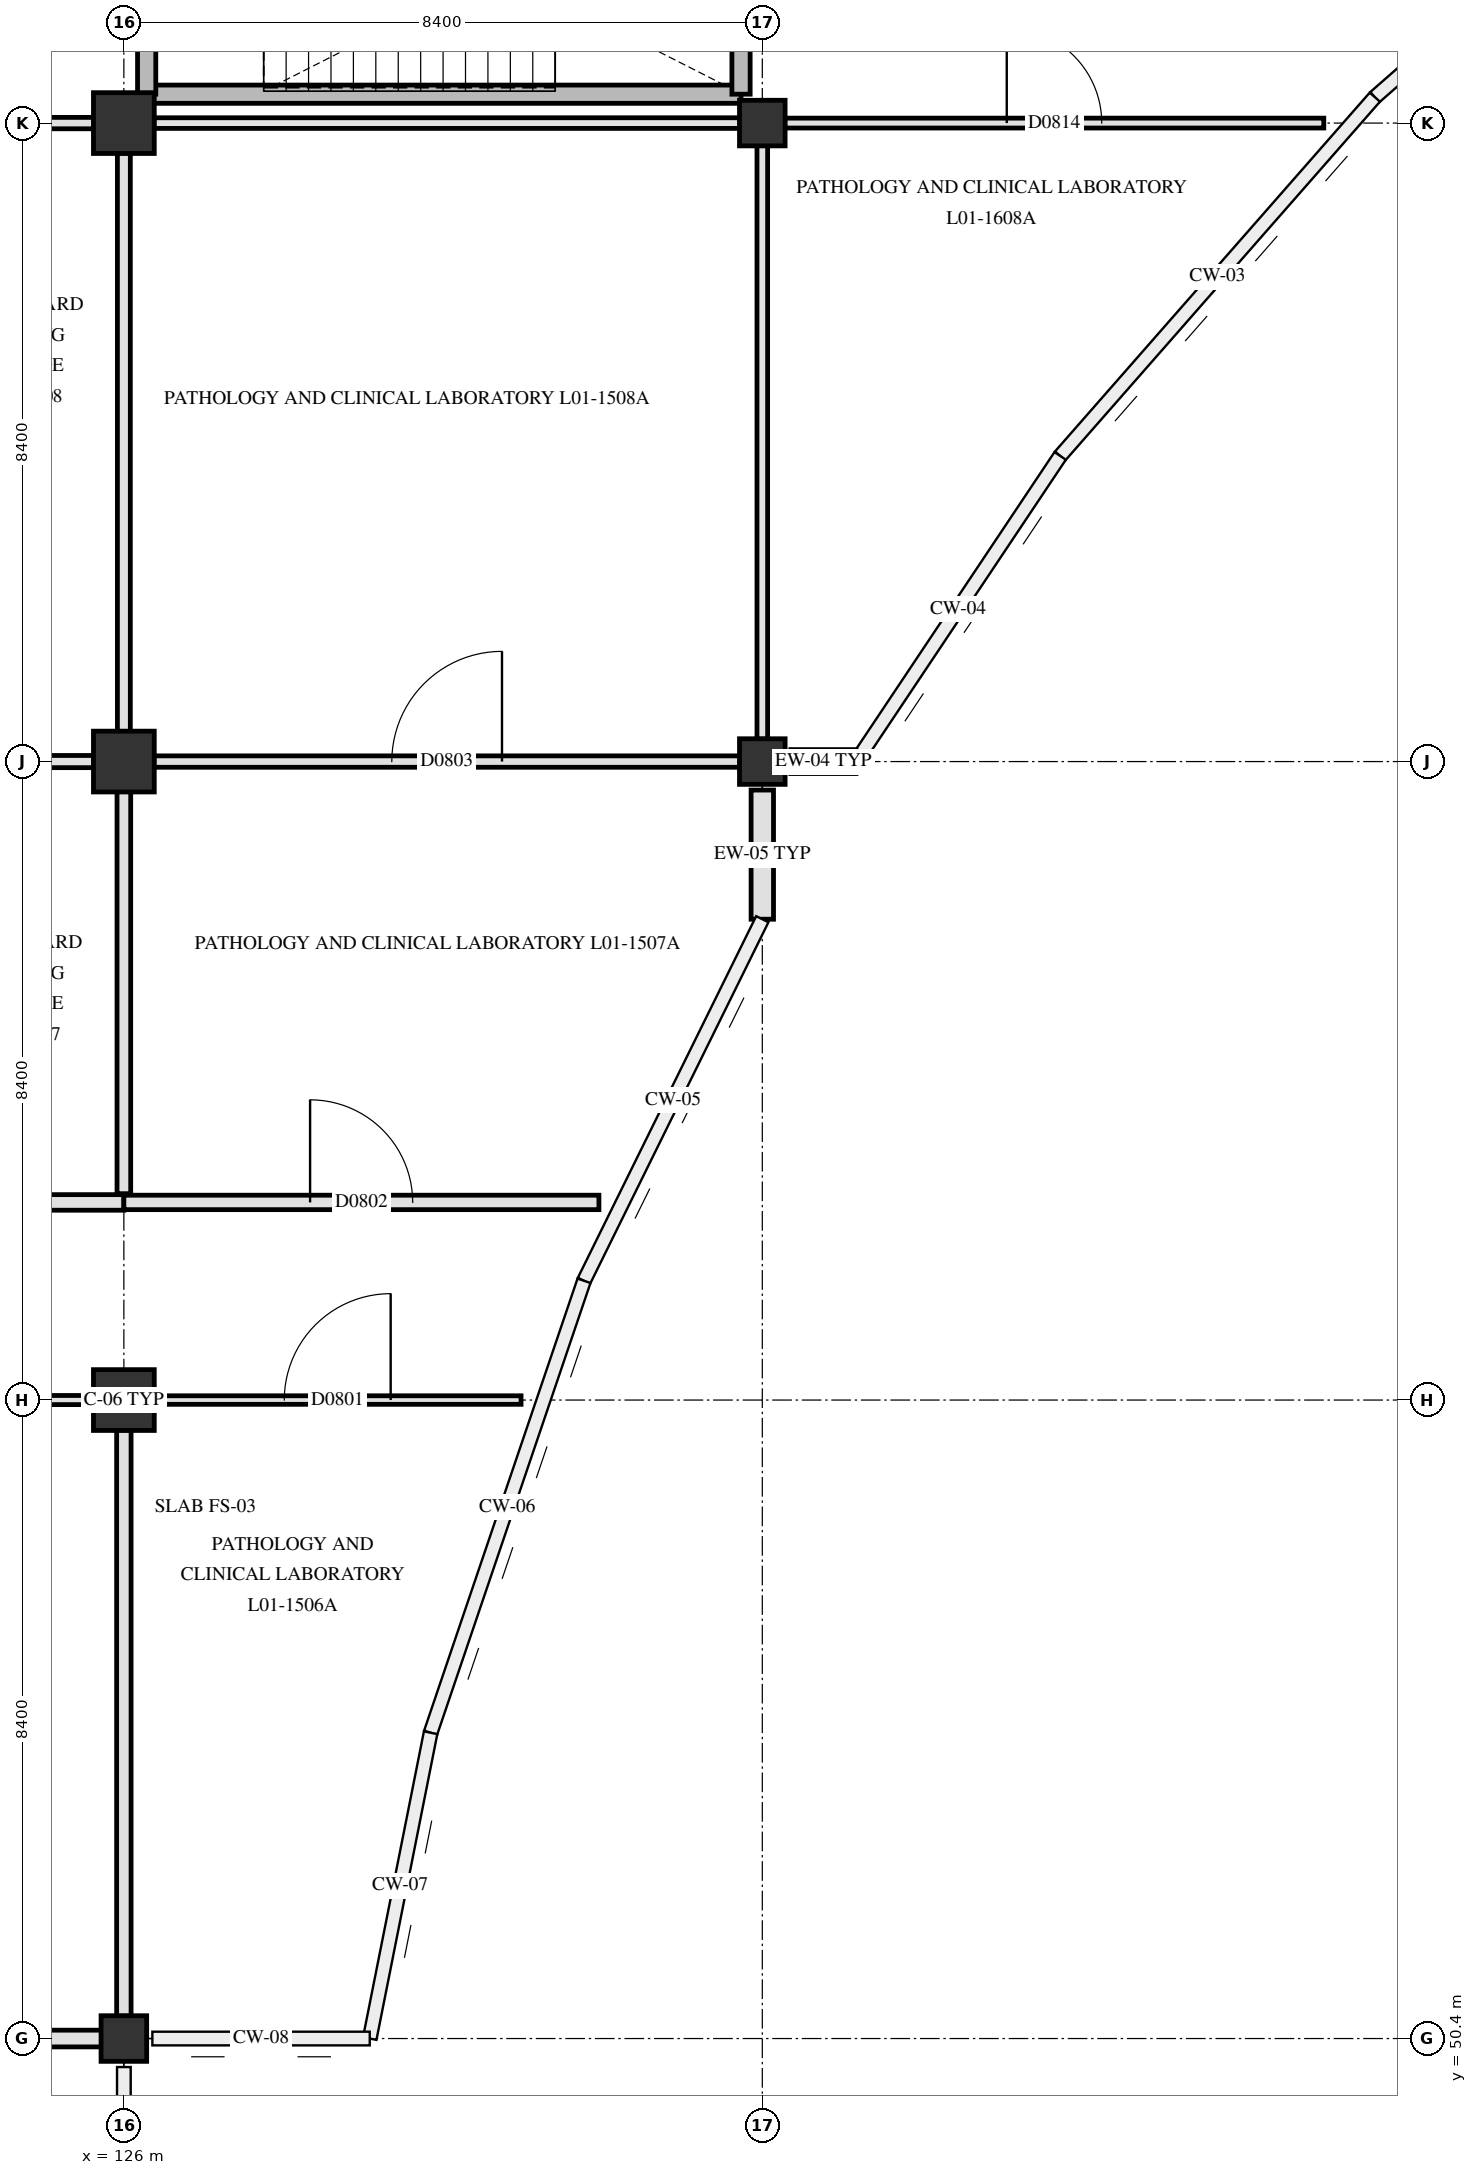
"""IFC4 building model, lengths in metres.
Left out: names, types, materials, properties, quantities, classifications, styles, units other than length and angle.
Written with IfcOpenShell. Run it as: python <this file> out.ifc"""

import sys

from ifc_helpers import new_model, si_unit, direction, frame, frame_2d, origin, origin_2d, place, context, subcontext, project, spatial, rectangle, circle, extrude, element, fill, save


model = new_model("IFC4")
c1 = context("Model", 3, precision=1e-05, world=origin(), true_north=direction((0.0, 1.0)))
c2 = subcontext(c1, "Body", "Model", "MODEL_VIEW")
j1 = project(units=[si_unit("LENGTHUNIT", "METRE"), si_unit("PLANEANGLEUNIT", "RADIAN")], contexts=[c1])
p1 = place(None, origin())
s1 = spatial("IfcSite", under=j1, at=p1, CompositionType="ELEMENT")
p2 = place(p1, origin())
s2 = spatial("IfcBuilding", under=s1, at=p2, CompositionType="ELEMENT")
p3 = place(p2, frame((0.0, 0.0, 4.8)))
s3 = spatial("IfcBuildingStorey", under=s2, at=p3, CompositionType="ELEMENT", Elevation=4.8)
p4 = place(p3, frame((126.0, 50.4, 0.0), z_axis=(0.0, 0.0, 1.0), x_axis=(1.0, 0.0, 0.0)))
e1 = element("IfcColumn", 1, at=p4, inside=s3, PredefinedType="COLUMN", context=c2, shape_type="SweptSolid", body=[
    extrude(rectangle(XDim=0.6, YDim=0.6, at=origin_2d()), origin(), (0.0, 0.0, 1.0), 4.5),
])
for number, where, z_axis, x_axis in (
    (2, (126.0, 58.8, 0.0), (0.0, 0.0, 1.0), (1.0, 0.0, 0.0)),
    (3, (126.0, 67.2, 0.0), (0.0, 0.0, 1.0), (1.0, 0.0, 0.0)),
    (4, (126.0, 75.6, 0.0), (0.0, 0.0, 1.0), (1.0, 0.0, 0.0)),
):
    element("IfcColumn", number, at=place(p3, frame(where, z_axis=z_axis, x_axis=x_axis)), inside=s3, PredefinedType="COLUMN", context=c2, shape_type="SweptSolid", body=[
        extrude(circle(Radius=0.4, at=origin_2d()), origin(), (0.0, 0.0, 1.0), 4.5),
    ])
for number, where, z_axis, x_axis in (
    (5, (134.4, 67.2, 0.0), (0.0, 0.0, 1.0), (1.0, 0.0, 0.0)),
    (6, (134.4, 75.6, 0.0), (0.0, 0.0, 1.0), (1.0, 0.0, 0.0)),
):
    element("IfcColumn", number, at=place(p3, frame(where, z_axis=z_axis, x_axis=x_axis)), inside=s3, PredefinedType="COLUMN", context=c2, shape_type="SweptSolid", body=[
        extrude(rectangle(XDim=0.6, YDim=0.6, at=origin_2d()), origin(), (0.0, 0.0, 1.0), 4.5),
    ])
p5 = place(p3, frame((135.633, 67.2, 0.0), z_axis=(0.0, 0.0, 1.0), x_axis=(-1.0, 0.0, 0.0)))
e7 = element("IfcWall", 7, at=p5, inside=s3, PredefinedType="SOLIDWALL", context=c2, shape_type="SweptSolid", body=[
    extrude(rectangle(XDim=0.858, YDim=0.315, at=frame_2d((0.429, 0.0))), origin(), (0.0, 0.0, 1.0), 4.14),
])
p6 = place(p3, frame((134.4, 66.825, 0.0), z_axis=(0.0, 0.0, 1.0), x_axis=(0.0, -1.0, 0.0)))
e8 = element("IfcWall", 8, at=p6, inside=s3, PredefinedType="SOLIDWALL", context=c2, shape_type="SweptSolid", body=[
    extrude(rectangle(XDim=1.699, YDim=0.295, at=frame_2d((0.85, 0.0))), origin(), (0.0, 0.0, 1.0), 4.14),
])
p7 = place(p3, frame((126.3, 75.98, 0.0), z_axis=(0.0, 0.0, 1.0), x_axis=(1.0, 0.0, 0.0)))
e9 = element("IfcWall", 9, at=p7, inside=s3, PredefinedType="SHEAR", context=c2, shape_type="SweptSolid", body=[
    extrude(rectangle(XDim=7.82, YDim=0.24, at=frame_2d((3.91, 0.0))), origin(), (0.0, 0.0, 1.0), 4.15),
])
for number, where, z_axis, x_axis in (
    (10, (126.3, 75.98, 0.0), (0.0, 0.0, 1.0), (0.0, 1.0, 0.0)),
    (11, (134.12, 75.98, 0.0), (0.0, 0.0, 1.0), (0.0, 1.0, 0.0)),
):
    element("IfcWall", number, at=place(p3, frame(where, z_axis=z_axis, x_axis=x_axis)), inside=s3, PredefinedType="SHEAR", context=c2, shape_type="SweptSolid", body=[
        extrude(rectangle(XDim=3.32, YDim=0.24, at=frame_2d((1.66, 0.0))), origin(), (0.0, 0.0, 1.0), 4.15),
    ])
p8 = place(p3, frame((117.995, 50.4, 0.0), z_axis=(0.0, 0.0, 1.0), x_axis=(1.0, 0.0, 0.0)))
e12 = element("IfcWall", 12, at=p8, inside=s3, PredefinedType="PARTITIONING", context=c2, shape_type="SweptSolid", body=[
    extrude(rectangle(XDim=7.71, YDim=0.22, at=frame_2d((3.855, 0.0))), origin(), (0.0, 0.0, 1.0), 3.54),
])
p9 = place(p3, frame((117.995, 58.8, 0.0), z_axis=(0.0, 0.0, 1.0), x_axis=(1.0, 0.0, 0.0)))
e13 = element("IfcWall", 13, at=p9, inside=s3, PredefinedType="PARTITIONING", context=c2, shape_type="SweptSolid", body=[
    extrude(rectangle(XDim=7.61, YDim=0.12, at=frame_2d((3.805, 0.0))), origin(), (0.0, 0.0, 1.0), 3.54),
])
p10 = place(p9, frame((2.935, 0.0, 0.0)))
e14 = element("IfcOpeningElement", 14, at=p10, cuts=e13, PredefinedType="OPENING", context=c2, shape_type="SweptSolid", body=[
    extrude(rectangle(XDim=1.74, YDim=2.24, at=frame_2d((0.87, 1.12))), frame((0.0, 0.07, 0.0), z_axis=(0.0, -1.0, 0.0), x_axis=(1.0, 0.0, 0.0)), (0.0, 0.0, 1.0), 0.14),
])
p11 = place(p3, frame((126.395, 58.8, 0.0), z_axis=(0.0, 0.0, 1.0), x_axis=(1.0, 0.0, 0.0)))
e15 = element("IfcWall", 15, at=p11, inside=s3, PredefinedType="PARTITIONING", context=c2, shape_type="SweptSolid", body=[
    extrude(rectangle(XDim=4.831, YDim=0.112, at=frame_2d((2.416, 0.0))), origin(), (0.0, 0.0, 1.0), 4.14),
])
p12 = place(p11, frame((1.715, 0.0, 0.0)))
e16 = element("IfcOpeningElement", 16, at=p12, cuts=e15, PredefinedType="OPENING", context=c2, shape_type="SweptSolid", body=[
    extrude(rectangle(XDim=1.4, YDim=2.2, at=frame_2d((0.7, 1.1))), frame((0.0, 0.066, 0.0), z_axis=(0.0, -1.0, 0.0), x_axis=(1.0, 0.0, 0.0)), (0.0, 0.0, 1.0), 0.132),
])
p13 = place(p3, frame((121.075, 61.4, 0.0), z_axis=(0.0, 0.0, 1.0), x_axis=(1.0, 0.0, 0.0)))
e17 = element("IfcWall", 17, at=p13, inside=s3, PredefinedType="PARTITIONING", context=c2, shape_type="SweptSolid", body=[
    extrude(rectangle(XDim=4.925, YDim=0.205, at=frame_2d((2.462, 0.0))), origin(), (0.0, 0.0, 1.0), 3.59),
])
p14 = place(p13, frame((1.542, 0.0, 0.0)))
e18 = element("IfcOpeningElement", 18, at=p14, cuts=e17, PredefinedType="OPENING", context=c2, shape_type="SweptSolid", body=[
    extrude(rectangle(XDim=1.84, YDim=2.28, at=frame_2d((0.92, 1.14))), frame((0.0, 0.113, 0.0), z_axis=(0.0, -1.0, 0.0), x_axis=(1.0, 0.0, 0.0)), (0.0, 0.0, 1.0), 0.225),
])
p15 = place(p3, frame((126.0, 61.4, 0.0), z_axis=(0.0, 0.0, 1.0), x_axis=(1.0, 0.0, 0.0)))
e19 = element("IfcWall", 19, at=p15, inside=s3, PredefinedType="PARTITIONING", context=c2, shape_type="SweptSolid", body=[
    extrude(rectangle(XDim=6.25, YDim=0.19, at=frame_2d((3.125, 0.0))), origin(), (0.0, 0.0, 1.0), 3.59),
])
p16 = place(p15, frame((2.45, 0.0, 0.0)))
e20 = element("IfcOpeningElement", 20, at=p16, cuts=e19, PredefinedType="OPENING", context=c2, shape_type="SweptSolid", body=[
    extrude(rectangle(XDim=1.35, YDim=2.2, at=frame_2d((0.675, 1.1))), frame((0.0, 0.105, 0.0), z_axis=(0.0, -1.0, 0.0), x_axis=(1.0, 0.0, 0.0)), (0.0, 0.0, 1.0), 0.21),
])
p17 = place(p3, frame((124.1, 67.2, 0.0), z_axis=(0.0, 0.0, 1.0), x_axis=(1.0, 0.0, 0.0)))
e21 = element("IfcWall", 21, at=p17, inside=s3, PredefinedType="PARTITIONING", context=c2, shape_type="SweptSolid", body=[
    extrude(rectangle(XDim=1.505, YDim=0.16, at=frame_2d((0.752, 0.0))), origin(), (0.0, 0.0, 1.0), 4.14),
])
p18 = place(p3, frame((126.395, 67.2, 0.0), z_axis=(0.0, 0.0, 1.0), x_axis=(1.0, 0.0, 0.0)))
e22 = element("IfcWall", 22, at=p18, inside=s3, PredefinedType="PARTITIONING", context=c2, shape_type="SweptSolid", body=[
    extrude(rectangle(XDim=7.71, YDim=0.15, at=frame_2d((3.855, 0.0))), origin(), (0.0, 0.0, 1.0), 3.54),
])
p19 = place(p18, frame((3.13, 0.0, 0.0)))
e23 = element("IfcOpeningElement", 23, at=p19, cuts=e22, PredefinedType="OPENING", context=c2, shape_type="SweptSolid", body=[
    extrude(rectangle(XDim=1.45, YDim=2.2, at=frame_2d((0.725, 1.1))), frame((0.0, 0.085, 0.0), z_axis=(0.0, -1.0, 0.0), x_axis=(1.0, 0.0, 0.0)), (0.0, 0.0, 1.0), 0.17),
])
p20 = place(p3, frame((117.995, 75.6, 0.0), z_axis=(0.0, 0.0, 1.0), x_axis=(1.0, 0.0, 0.0)))
e24 = element("IfcWall", 24, at=p20, inside=s3, PredefinedType="PARTITIONING", context=c2, shape_type="SweptSolid", body=[
    extrude(rectangle(XDim=7.61, YDim=0.15, at=frame_2d((3.805, 0.0))), origin(), (0.0, 0.0, 1.0), 3.54),
])
p21 = place(p20, frame((3.295, 0.0, 0.0)))
e25 = element("IfcOpeningElement", 25, at=p21, cuts=e24, PredefinedType="OPENING", context=c2, shape_type="SweptSolid", body=[
    extrude(rectangle(XDim=1.02, YDim=2.12, at=frame_2d((0.51, 1.06))), frame((0.0, 0.085, 0.0), z_axis=(0.0, -1.0, 0.0), x_axis=(1.0, 0.0, 0.0)), (0.0, 0.0, 1.0), 0.17),
])
p22 = place(p3, frame((126.395, 75.6, 0.0), z_axis=(0.0, 0.0, 1.0), x_axis=(1.0, 0.0, 0.0)))
e26 = element("IfcWall", 26, at=p22, inside=s3, PredefinedType="PARTITIONING", context=c2, shape_type="SweptSolid", body=[
    extrude(rectangle(XDim=7.71, YDim=0.14, at=frame_2d((3.855, 0.0))), origin(), (0.0, 0.0, 1.0), 3.54),
])
p23 = place(p3, frame((134.695, 75.6, 0.0), z_axis=(0.0, 0.0, 1.0), x_axis=(1.0, 0.0, 0.0)))
e27 = element("IfcWall", 27, at=p23, inside=s3, PredefinedType="PARTITIONING", context=c2, shape_type="SweptSolid", body=[
    extrude(rectangle(XDim=7.093, YDim=0.13, at=frame_2d((3.546, 0.0))), origin(), (0.0, 0.0, 1.0), 4.14),
])
p24 = place(p23, frame((2.921, 0.0, 0.0)))
e28 = element("IfcOpeningElement", 28, at=p24, cuts=e27, PredefinedType="OPENING", context=c2, shape_type="SweptSolid", body=[
    extrude(rectangle(XDim=1.25, YDim=2.2, at=frame_2d((0.625, 1.1))), frame((0.0, 0.075, 0.0), z_axis=(0.0, -1.0, 0.0), x_axis=(1.0, 0.0, 0.0)), (0.0, 0.0, 1.0), 0.15),
])
p25 = place(p3, frame((126.0, 50.695, 0.0), z_axis=(0.0, 0.0, 1.0), x_axis=(0.0, 1.0, 0.0)))
e29 = element("IfcWall", 29, at=p25, inside=s3, PredefinedType="PARTITIONING", context=c2, shape_type="SweptSolid", body=[
    extrude(rectangle(XDim=7.71, YDim=0.19, at=frame_2d((3.855, 0.0))), origin(), (0.0, 0.0, 1.0), 3.59),
])
p26 = place(p3, frame((126.0, 61.515, 0.0), z_axis=(0.0, 0.0, 1.0), x_axis=(0.0, 1.0, 0.0)))
e30 = element("IfcWall", 30, at=p26, inside=s3, PredefinedType="PARTITIONING", context=c2, shape_type="SweptSolid", body=[
    extrude(rectangle(XDim=5.29, YDim=0.18, at=frame_2d((2.645, 0.0))), origin(), (0.0, 0.0, 1.0), 3.59),
])
p27 = place(p3, frame((126.0, 67.595, 0.0), z_axis=(0.0, 0.0, 1.0), x_axis=(0.0, 1.0, 0.0)))
e31 = element("IfcWall", 31, at=p27, inside=s3, PredefinedType="PARTITIONING", context=c2, shape_type="SweptSolid", body=[
    extrude(rectangle(XDim=7.61, YDim=0.17, at=frame_2d((3.805, 0.0))), origin(), (0.0, 0.0, 1.0), 3.59),
])
p28 = place(p3, frame((134.4, 67.495, 0.0), z_axis=(0.0, 0.0, 1.0), x_axis=(0.0, 1.0, 0.0)))
e32 = element("IfcWall", 32, at=p28, inside=s3, PredefinedType="PARTITIONING", context=c2, shape_type="SweptSolid", body=[
    extrude(rectangle(XDim=7.81, YDim=0.14, at=frame_2d((3.905, 0.0))), origin(), (0.0, 0.0, 1.0), 3.59),
])
p29 = place(p12, origin())
e33 = element("IfcDoor", 33, at=p29, inside=s3, OperationType="SINGLE_SWING_RIGHT", PredefinedType="DOOR", context=c2, shape_type="SweptSolid", body=[
    extrude(rectangle(XDim=1.4, YDim=2.2, at=frame_2d((0.7, 1.1))), frame((0.0, 0.025, 0.0), z_axis=(0.0, -1.0, 0.0), x_axis=(1.0, 0.0, 0.0)), (0.0, 0.0, 1.0), 0.05),
])
fill(e16, e33)
p30 = place(p16, origin())
e34 = element("IfcDoor", 34, at=p30, inside=s3, OperationType="SINGLE_SWING_LEFT", PredefinedType="DOOR", context=c2, shape_type="SweptSolid", body=[
    extrude(rectangle(XDim=1.35, YDim=2.2, at=frame_2d((0.675, 1.1))), frame((0.0, 0.025, 0.0), z_axis=(0.0, -1.0, 0.0), x_axis=(1.0, 0.0, 0.0)), (0.0, 0.0, 1.0), 0.05),
])
fill(e20, e34)
p31 = place(p19, origin())
e35 = element("IfcDoor", 35, at=p31, inside=s3, OperationType="SINGLE_SWING_RIGHT", PredefinedType="DOOR", context=c2, shape_type="SweptSolid", body=[
    extrude(rectangle(XDim=1.45, YDim=2.2, at=frame_2d((0.725, 1.1))), frame((0.0, 0.025, 0.0), z_axis=(0.0, -1.0, 0.0), x_axis=(1.0, 0.0, 0.0)), (0.0, 0.0, 1.0), 0.05),
])
fill(e23, e35)
p32 = place(p24, origin())
e36 = element("IfcDoor", 36, at=p32, inside=s3, OperationType="SINGLE_SWING_LEFT", PredefinedType="DOOR", context=c2, shape_type="SweptSolid", body=[
    extrude(rectangle(XDim=1.25, YDim=2.2, at=frame_2d((0.625, 1.1))), frame((0.0, 0.025, 0.0), z_axis=(0.0, -1.0, 0.0), x_axis=(1.0, 0.0, 0.0)), (0.0, 0.0, 1.0), 0.05),
])
fill(e28, e36)
save(model, sys.argv[1])
